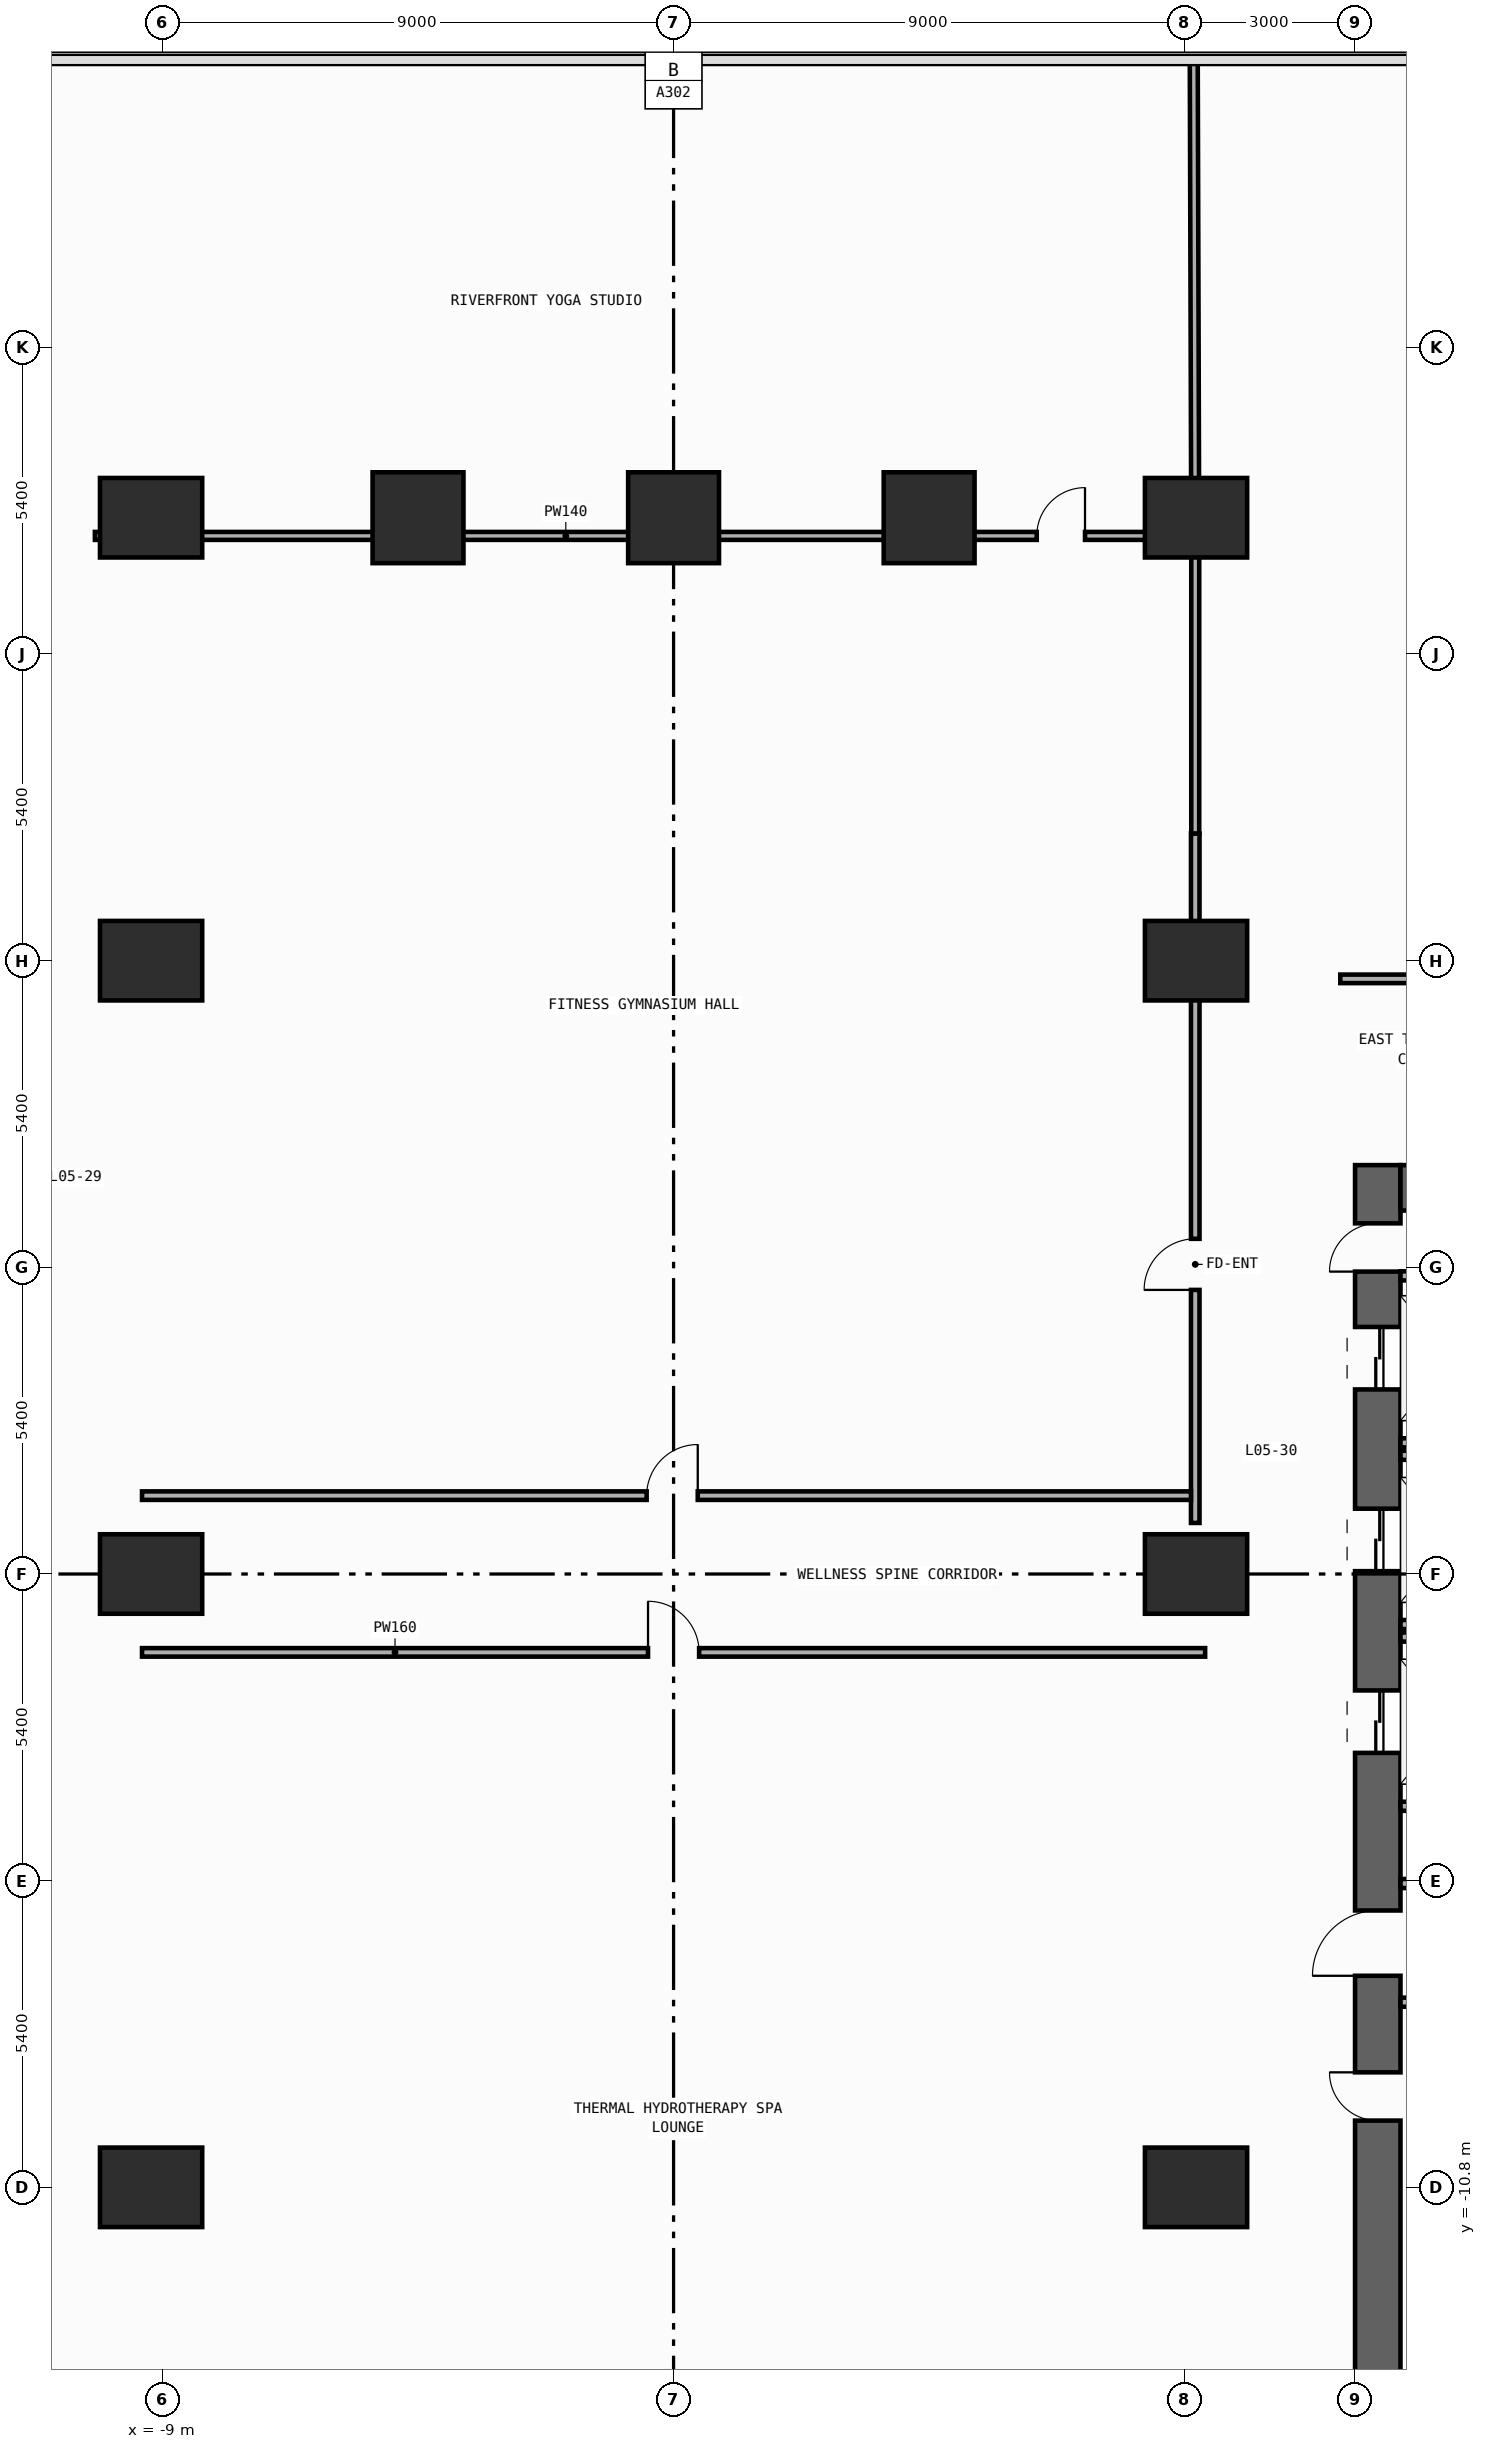
"""IFC4 building model, lengths in metres.
Left out: names, types, materials, properties, quantities, classifications, styles, units other than length and angle.
Written with IfcOpenShell. Run it as: python <this file> out.ifc"""

import sys

from ifc_helpers import new_model, si_unit, direction, frame, frame_2d, origin, origin_2d, place, context, subcontext, project, spatial, rectangle, extrude, element, fill, save


model = new_model("IFC4")
c1 = context("Model", 3, precision=1e-05, world=origin(), true_north=direction((0.0, 1.0)))
c2 = subcontext(c1, "Body", "Model", "MODEL_VIEW")
j1 = project(units=[si_unit("LENGTHUNIT", "METRE"), si_unit("PLANEANGLEUNIT", "RADIAN")], contexts=[c1])
p1 = place(None, origin())
s1 = spatial("IfcSite", under=j1, at=p1, CompositionType="ELEMENT")
p2 = place(p1, origin())
s2 = spatial("IfcBuilding", under=s1, at=p2, CompositionType="ELEMENT")
p3 = place(p2, frame((0.0, 0.0, 21.0)))
s3 = spatial("IfcBuildingStorey", under=s2, at=p3, CompositionType="ELEMENT", Elevation=21.0)
p4 = place(p3, frame((12.4, -19.8, 0.0), z_axis=(0.0, 0.0, 1.0), x_axis=(0.0, 1.0, 0.0)))
e1 = element("IfcWall", 1, at=p4, inside=s3, PredefinedType="SHEAR", context=c2, shape_type="SweptSolid", body=[
    extrude(rectangle(XDim=27.0, YDim=0.8, at=frame_2d((13.5, 0.0))), origin(), (0.0, 0.0, 1.0), 4.74),
])
p5 = place(p4, frame((23.05, 0.0, 0.0)))
e2 = element("IfcOpeningElement", 2, at=p5, cuts=e1, PredefinedType="OPENING", context=c2, shape_type="SweptSolid", body=[
    extrude(rectangle(XDim=1.1, YDim=2.2, at=frame_2d((0.55, 1.1))), frame((0.0, 0.41, 0.0), z_axis=(0.0, -1.0, 0.0), x_axis=(1.0, 0.0, 0.0)), (0.0, 0.0, 1.0), 0.82),
])
p6 = place(p4, frame((19.85, 0.0, 0.0)))
e3 = element("IfcOpeningElement", 3, at=p6, cuts=e1, PredefinedType="OPENING", context=c2, shape_type="SweptSolid", body=[
    extrude(rectangle(XDim=1.1, YDim=2.2, at=frame_2d((0.55, 1.1))), frame((0.0, 0.41, 0.0), z_axis=(0.0, -1.0, 0.0), x_axis=(1.0, 0.0, 0.0)), (0.0, 0.0, 1.0), 0.82),
])
p7 = place(p4, frame((16.65, 0.0, 0.0)))
e4 = element("IfcOpeningElement", 4, at=p7, cuts=e1, PredefinedType="OPENING", context=c2, shape_type="SweptSolid", body=[
    extrude(rectangle(XDim=1.1, YDim=2.2, at=frame_2d((0.55, 1.1))), frame((0.0, 0.41, 0.0), z_axis=(0.0, -1.0, 0.0), x_axis=(1.0, 0.0, 0.0)), (0.0, 0.0, 1.0), 0.82),
])
p8 = place(p4, frame((10.175, 0.0, 0.0)))
e5 = element("IfcOpeningElement", 5, at=p8, cuts=e1, PredefinedType="OPENING", context=c2, shape_type="SweptSolid", body=[
    extrude(rectangle(XDim=0.85, YDim=2.1, at=frame_2d((0.425, 1.05))), frame((0.0, 0.41, 0.0), z_axis=(0.0, -1.0, 0.0), x_axis=(1.0, 0.0, 0.0)), (0.0, 0.0, 1.0), 0.82),
])
p9 = place(p4, frame((12.725, 0.0, 0.0)))
e6 = element("IfcOpeningElement", 6, at=p9, cuts=e1, PredefinedType="OPENING", context=c2, shape_type="SweptSolid", body=[
    extrude(rectangle(XDim=1.15, YDim=2.2, at=frame_2d((0.575, 1.1))), frame((0.0, 0.41, 0.0), z_axis=(0.0, -1.0, 0.0), x_axis=(1.0, 0.0, 0.0)), (0.0, 0.0, 1.0), 0.82),
])
p10 = place(p4, frame((25.125, 0.0, 0.0)))
e7 = element("IfcOpeningElement", 7, at=p10, cuts=e1, PredefinedType="OPENING", context=c2, shape_type="SweptSolid", body=[
    extrude(rectangle(XDim=0.85, YDim=2.1, at=frame_2d((0.425, 1.05))), frame((0.0, 0.41, 0.0), z_axis=(0.0, -1.0, 0.0), x_axis=(1.0, 0.0, 0.0)), (0.0, 0.0, 1.0), 0.82),
])
p11 = place(p3, frame((12.8, 6.8, 0.0), z_axis=(0.0, 0.0, 1.0), x_axis=(1.0, 0.0, 0.0)))
e8 = element("IfcWall", 8, at=p11, inside=s3, PredefinedType="SHEAR", context=c2, shape_type="SweptSolid", body=[
    extrude(rectangle(XDim=6.8, YDim=0.8, at=frame_2d((3.4, 0.0))), origin(), (0.0, 0.0, 1.0), 4.74),
])
for number, where, z_axis, x_axis in (
    (9, (-9.2, -10.8, 0.0), (0.0, 0.0, 1.0), (1.0, 0.0, 0.0)),
    (10, (-9.2, 0.0, 0.0), (0.0, 0.0, 1.0), (1.0, 0.0, 0.0)),
    (11, (-9.2, 10.8, 0.0), (0.0, 0.0, 1.0), (1.0, 0.0, 0.0)),
    (12, (-9.2, 18.6, 0.0), (0.0, 0.0, 1.0), (1.0, 0.0, 0.0)),
    (13, (9.2, -10.8, 0.0), (0.0, 0.0, 1.0), (1.0, 0.0, 0.0)),
    (14, (9.2, 0.0, 0.0), (0.0, 0.0, 1.0), (1.0, 0.0, 0.0)),
    (15, (9.2, 10.8, 0.0), (0.0, 0.0, 1.0), (1.0, 0.0, 0.0)),
    (16, (9.2, 18.6, 0.0), (0.0, 0.0, 1.0), (1.0, 0.0, 0.0)),
):
    element("IfcColumn", number, at=place(p3, frame(where, z_axis=z_axis, x_axis=x_axis)), inside=s3, PredefinedType="COLUMN", context=c2, shape_type="SweptSolid", body=[
        extrude(rectangle(XDim=1.8, YDim=1.4, at=origin_2d()), origin(), (0.0, 0.0, 1.0), 5.0),
    ])
for number, where, z_axis, x_axis in (
    (17, (-4.5, 18.6, 0.0), (0.0, 0.0, 1.0), (1.0, 0.0, 0.0)),
    (18, (0.0, 18.6, 0.0), (0.0, 0.0, 1.0), (1.0, 0.0, 0.0)),
    (19, (4.5, 18.6, 0.0), (0.0, 0.0, 1.0), (1.0, 0.0, 0.0)),
):
    element("IfcColumn", number, at=place(p3, frame(where, z_axis=z_axis, x_axis=x_axis)), inside=s3, PredefinedType="COLUMN", context=c2, shape_type="SweptSolid", body=[
        extrude(rectangle(XDim=1.6, YDim=1.6, at=origin_2d()), origin(), (0.0, 0.0, 1.0), 5.0),
    ])
for number, where, z_axis, x_axis in (
    (20, (12.8, 2.31, 0.0), (0.0, 0.0, 1.0), (1.0, 0.0, 0.0)),
    (21, (12.8, -0.89, 0.0), (0.0, 0.0, 1.0), (1.0, 0.0, 0.0)),
    (22, (12.8, 2.09, 0.0), (0.0, 0.0, 1.0), (1.0, 0.0, 0.0)),
    (23, (12.8, -4.09, 0.0), (0.0, 0.0, 1.0), (1.0, 0.0, 0.0)),
    (24, (12.8, -1.11, 0.0), (0.0, 0.0, 1.0), (1.0, 0.0, 0.0)),
):
    element("IfcWall", number, at=place(p3, frame(where, z_axis=z_axis, x_axis=x_axis)), inside=s3, PredefinedType="STANDARD", context=c2, shape_type="SweptSolid", body=[
        extrude(rectangle(XDim=2.19, YDim=0.16, at=frame_2d((1.095, 0.0))), origin(), (0.0, 0.0, 1.0), 4.74),
    ])
for number, where, z_axis, x_axis in (
    (25, (12.8, -5.45, 0.0), (0.0, 0.0, 1.0), (1.0, 0.0, 0.0)),
    (26, (12.8, -7.54, 0.0), (0.0, 0.0, 1.0), (1.0, 0.0, 0.0)),
    (27, (12.8, 5.25, 0.0), (0.0, 0.0, 1.0), (1.0, 0.0, 0.0)),
):
    element("IfcWall", number, at=place(p3, frame(where, z_axis=z_axis, x_axis=x_axis)), inside=s3, PredefinedType="STANDARD", context=c2, shape_type="SweptSolid", body=[
        extrude(rectangle(XDim=2.6, YDim=0.16, at=frame_2d((1.3, 0.0))), origin(), (0.0, 0.0, 1.0), 4.74),
    ])
p12 = place(p3, frame((9.186, 0.899, 0.0), z_axis=(0.0, 0.0, 1.0), x_axis=(0.0, 1.0, 0.0)))
e28 = element("IfcWall", 28, at=p12, inside=s3, PredefinedType="PARTITIONING", context=c2, shape_type="SweptSolid", body=[
    extrude(rectangle(XDim=12.141, YDim=0.15, at=frame_2d((6.07, 0.0))), origin(), (0.0, 0.0, 1.0), 3.94),
])
p13 = place(p12, frame((4.103, 0.0, 0.0)))
e29 = element("IfcOpeningElement", 29, at=p13, cuts=e28, PredefinedType="OPENING", context=c2, shape_type="SweptSolid", body=[
    extrude(rectangle(XDim=0.9, YDim=2.15, at=frame_2d((0.45, 1.075))), frame((0.0, 0.085, 0.0), z_axis=(0.0, -1.0, 0.0), x_axis=(1.0, 0.0, 0.0)), (0.0, 0.0, 1.0), 0.17),
])
p14 = place(p3, frame((-9.36, 1.38, 0.0), z_axis=(0.0, 0.0, 1.0), x_axis=(1.0, 0.0, 0.0)))
e30 = element("IfcWall", 30, at=p14, inside=s3, PredefinedType="PARTITIONING", context=c2, shape_type="SweptSolid", body=[
    extrude(rectangle(XDim=18.471, YDim=0.15, at=frame_2d((9.235, 0.0))), origin(), (0.0, 0.0, 1.0), 4.74),
])
p15 = place(p14, frame((8.886, 0.0, 0.0)))
e31 = element("IfcOpeningElement", 31, at=p15, cuts=e30, PredefinedType="OPENING", context=c2, shape_type="SweptSolid", body=[
    extrude(rectangle(XDim=0.9, YDim=2.15, at=frame_2d((0.45, 1.075))), frame((0.0, 0.085, 0.0), z_axis=(0.0, -1.0, 0.0), x_axis=(1.0, 0.0, 0.0)), (0.0, 0.0, 1.0), 0.17),
])
p16 = place(p3, frame((-9.36, -1.38, 0.0), z_axis=(0.0, 0.0, 1.0), x_axis=(1.0, 0.0, 0.0)))
e32 = element("IfcWall", 32, at=p16, inside=s3, PredefinedType="PARTITIONING", context=c2, shape_type="SweptSolid", body=[
    extrude(rectangle(XDim=18.72, YDim=0.15, at=frame_2d((9.36, 0.0))), origin(), (0.0, 0.0, 1.0), 4.74),
])
p17 = place(p16, frame((8.91, 0.0, 0.0)))
e33 = element("IfcOpeningElement", 33, at=p17, cuts=e32, PredefinedType="OPENING", context=c2, shape_type="SweptSolid", body=[
    extrude(rectangle(XDim=0.9, YDim=2.15, at=frame_2d((0.45, 1.075))), frame((0.0, 0.085, 0.0), z_axis=(0.0, -1.0, 0.0), x_axis=(1.0, 0.0, 0.0)), (0.0, 0.0, 1.0), 0.17),
])
p18 = place(p3, frame((11.74, 10.48, 0.0), z_axis=(0.0, 0.0, 1.0), x_axis=(1.0, 0.0, 0.0)))
e34 = element("IfcWall", 34, at=p18, inside=s3, PredefinedType="PARTITIONING", context=c2, shape_type="SweptSolid", body=[
    extrude(rectangle(XDim=12.315, YDim=0.15, at=frame_2d((6.157, 0.0))), origin(), (0.0, 0.0, 1.0), 4.74),
])
p19 = place(p18, frame((5.304, 0.0, 0.0)))
e35 = element("IfcOpeningElement", 35, at=p19, cuts=e34, PredefinedType="OPENING", context=c2, shape_type="SweptSolid", body=[
    extrude(rectangle(XDim=0.9, YDim=2.15, at=frame_2d((0.45, 1.075))), frame((0.0, 0.085, 0.0), z_axis=(0.0, -1.0, 0.0), x_axis=(1.0, 0.0, 0.0)), (0.0, 0.0, 1.0), 0.17),
])
p20 = place(p3, frame((9.186, 13.04, 0.0), z_axis=(0.0, 0.0, 1.0), x_axis=(0.0, 1.0, 0.0)))
e36 = element("IfcWall", 36, at=p20, inside=s3, PredefinedType="PARTITIONING", context=c2, shape_type="SweptSolid", body=[
    extrude(rectangle(XDim=5.24, YDim=0.14, at=frame_2d((2.62, 0.0))), origin(), (0.0, 0.0, 1.0), 3.94),
])
p21 = place(p3, frame((9.186, 18.28, 0.0), z_axis=(0.0, 0.0, 1.0), x_axis=(-0.003090003905, 0.999995225927, 0.0)))
e37 = element("IfcWall", 37, at=p21, inside=s3, PredefinedType="PARTITIONING", context=c2, shape_type="SweptSolid", body=[
    extrude(rectangle(XDim=8.375, YDim=0.14, at=frame_2d((4.188, 0.0))), origin(), (0.0, 0.0, 1.0), 3.94),
])
p22 = place(p3, frame((-10.19, 18.28, 0.0), z_axis=(0.0, 0.0, 1.0), x_axis=(1.0, 0.0, 0.0)))
e38 = element("IfcWall", 38, at=p22, inside=s3, PredefinedType="PARTITIONING", context=c2, shape_type="SweptSolid", body=[
    extrude(rectangle(XDim=19.306, YDim=0.14, at=frame_2d((9.653, 0.0))), origin(), (0.0, 0.0, 1.0), 3.94),
])
p23 = place(p22, frame((16.585, 0.0, 0.0)))
e39 = element("IfcOpeningElement", 39, at=p23, cuts=e38, PredefinedType="OPENING", context=c2, shape_type="SweptSolid", body=[
    extrude(rectangle(XDim=0.85, YDim=2.1, at=frame_2d((0.425, 1.05))), frame((0.0, 0.08, 0.0), z_axis=(0.0, -1.0, 0.0), x_axis=(1.0, 0.0, 0.0)), (0.0, 0.0, 1.0), 0.16),
])
p24 = place(p5, origin())
e40 = element("IfcDoor", 40, at=p24, inside=s3, OperationType="DOUBLE_DOOR_SLIDING", PredefinedType="DOOR", context=c2, shape_type="SweptSolid", body=[
    extrude(rectangle(XDim=1.1, YDim=2.2, at=frame_2d((0.55, 1.1))), frame((0.0, 0.025, 0.0), z_axis=(0.0, -1.0, 0.0), x_axis=(1.0, 0.0, 0.0)), (0.0, 0.0, 1.0), 0.05),
])
fill(e2, e40)
p25 = place(p6, origin())
e41 = element("IfcDoor", 41, at=p25, inside=s3, OperationType="DOUBLE_DOOR_SLIDING", PredefinedType="DOOR", context=c2, shape_type="SweptSolid", body=[
    extrude(rectangle(XDim=1.1, YDim=2.2, at=frame_2d((0.55, 1.1))), frame((0.0, 0.025, 0.0), z_axis=(0.0, -1.0, 0.0), x_axis=(1.0, 0.0, 0.0)), (0.0, 0.0, 1.0), 0.05),
])
fill(e3, e41)
p26 = place(p7, origin())
e42 = element("IfcDoor", 42, at=p26, inside=s3, OperationType="DOUBLE_DOOR_SLIDING", PredefinedType="DOOR", context=c2, shape_type="SweptSolid", body=[
    extrude(rectangle(XDim=1.1, YDim=2.2, at=frame_2d((0.55, 1.1))), frame((0.0, 0.025, 0.0), z_axis=(0.0, -1.0, 0.0), x_axis=(1.0, 0.0, 0.0)), (0.0, 0.0, 1.0), 0.05),
])
fill(e4, e42)
p27 = place(p8, origin())
e43 = element("IfcDoor", 43, at=p27, inside=s3, OperationType="SINGLE_SWING_RIGHT", PredefinedType="DOOR", context=c2, shape_type="SweptSolid", body=[
    extrude(rectangle(XDim=0.85, YDim=2.1, at=frame_2d((0.425, 1.05))), frame((0.0, 0.025, 0.0), z_axis=(0.0, -1.0, 0.0), x_axis=(1.0, 0.0, 0.0)), (0.0, 0.0, 1.0), 0.05),
])
fill(e5, e43)
p28 = place(p9, origin())
e44 = element("IfcDoor", 44, at=p28, inside=s3, OperationType="SINGLE_SWING_LEFT", PredefinedType="DOOR", context=c2, shape_type="SweptSolid", body=[
    extrude(rectangle(XDim=1.15, YDim=2.2, at=frame_2d((0.575, 1.1))), frame((0.0, 0.025, 0.0), z_axis=(0.0, -1.0, 0.0), x_axis=(1.0, 0.0, 0.0)), (0.0, 0.0, 1.0), 0.05),
])
fill(e6, e44)
p29 = place(p10, origin())
e45 = element("IfcDoor", 45, at=p29, inside=s3, OperationType="SINGLE_SWING_LEFT", PredefinedType="DOOR", context=c2, shape_type="SweptSolid", body=[
    extrude(rectangle(XDim=0.85, YDim=2.1, at=frame_2d((0.425, 1.05))), frame((0.0, 0.025, 0.0), z_axis=(0.0, -1.0, 0.0), x_axis=(1.0, 0.0, 0.0)), (0.0, 0.0, 1.0), 0.05),
])
fill(e7, e45)
p30 = place(p13, origin())
e46 = element("IfcDoor", 46, at=p30, inside=s3, OperationType="SINGLE_SWING_LEFT", PredefinedType="DOOR", context=c2, shape_type="SweptSolid", body=[
    extrude(rectangle(XDim=0.9, YDim=2.15, at=frame_2d((0.45, 1.075))), frame((0.0, 0.025, 0.0), z_axis=(0.0, -1.0, 0.0), x_axis=(1.0, 0.0, 0.0)), (0.0, 0.0, 1.0), 0.05),
])
fill(e29, e46)
p31 = place(p15, origin())
e47 = element("IfcDoor", 47, at=p31, inside=s3, OperationType="SINGLE_SWING_RIGHT", PredefinedType="DOOR", context=c2, shape_type="SweptSolid", body=[
    extrude(rectangle(XDim=0.9, YDim=2.15, at=frame_2d((0.45, 1.075))), frame((0.0, 0.025, 0.0), z_axis=(0.0, -1.0, 0.0), x_axis=(1.0, 0.0, 0.0)), (0.0, 0.0, 1.0), 0.05),
])
fill(e31, e47)
p32 = place(p17, origin())
e48 = element("IfcDoor", 48, at=p32, inside=s3, OperationType="SINGLE_SWING_LEFT", PredefinedType="DOOR", context=c2, shape_type="SweptSolid", body=[
    extrude(rectangle(XDim=0.9, YDim=2.15, at=frame_2d((0.45, 1.075))), frame((0.0, 0.025, 0.0), z_axis=(0.0, -1.0, 0.0), x_axis=(1.0, 0.0, 0.0)), (0.0, 0.0, 1.0), 0.05),
])
fill(e33, e48)
p33 = place(p23, origin())
e49 = element("IfcDoor", 49, at=p33, inside=s3, OperationType="SINGLE_SWING_RIGHT", PredefinedType="DOOR", context=c2, shape_type="SweptSolid", body=[
    extrude(rectangle(XDim=0.85, YDim=2.1, at=frame_2d((0.425, 1.05))), frame((0.0, 0.025, 0.0), z_axis=(0.0, -1.0, 0.0), x_axis=(1.0, 0.0, 0.0)), (0.0, 0.0, 1.0), 0.05),
])
fill(e39, e49)
save(model, sys.argv[1])
